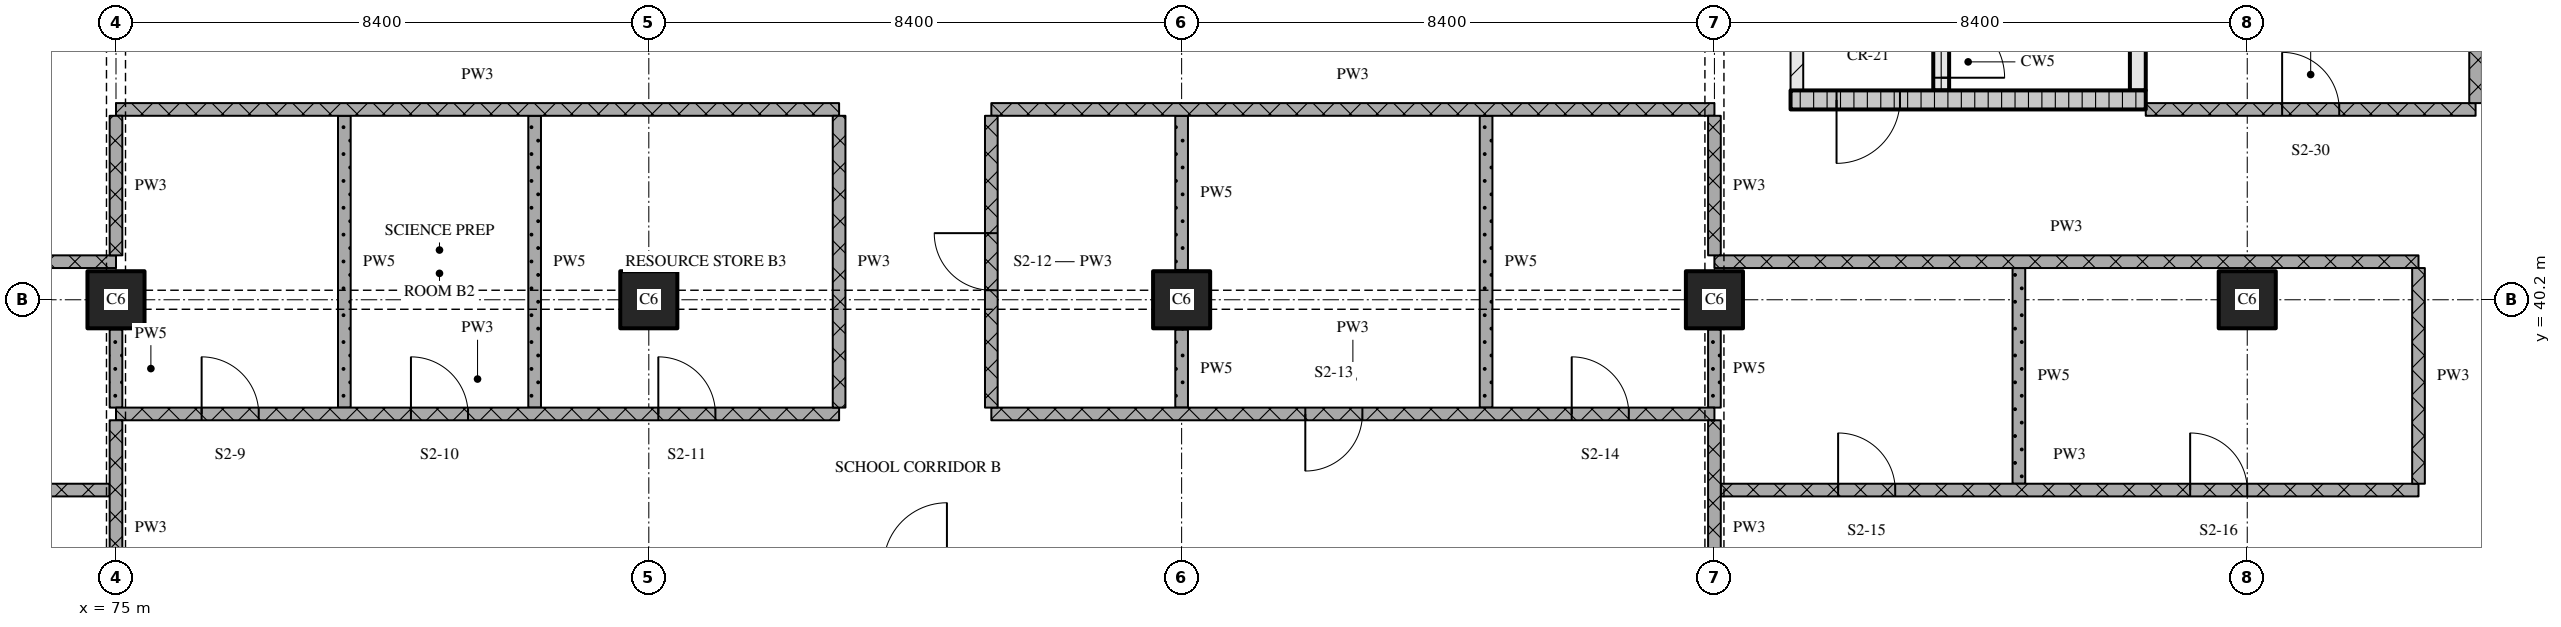
"""IFC4 building model, lengths in metres.
Left out: names, types, materials, properties, quantities, classifications, styles, units other than length and angle.
Written with IfcOpenShell. Run it as: python <this file> out.ifc"""

import sys

from ifc_helpers import new_model, si_unit, direction, frame, frame_2d, origin, origin_2d, place, context, subcontext, project, spatial, rectangle, extrude, element, fill, save


model = new_model("IFC4")
c1 = context("Model", 3, precision=1e-05, world=origin(), true_north=direction((0.0, 1.0)))
c2 = subcontext(c1, "Body", "Model", "MODEL_VIEW")
j1 = project(units=[si_unit("LENGTHUNIT", "METRE"), si_unit("PLANEANGLEUNIT", "RADIAN")], contexts=[c1])
p1 = place(None, origin())
s1 = spatial("IfcSite", under=j1, at=p1, CompositionType="ELEMENT")
p2 = place(p1, origin())
s2 = spatial("IfcBuilding", under=s1, at=p2, CompositionType="ELEMENT")
p3 = place(p2, frame((0.0, 0.0, 23.7)))
s3 = spatial("IfcBuildingStorey", under=s2, at=p3, CompositionType="ELEMENT", Elevation=23.7)
for number, where, z_axis, x_axis in (
    (1, (75.0, 40.2, 0.0), (0.0, 0.0, 1.0), (1.0, 0.0, 0.0)),
    (2, (83.4, 40.2, 0.0), (0.0, 0.0, 1.0), (1.0, 0.0, 0.0)),
    (3, (91.8, 40.2, 0.0), (0.0, 0.0, 1.0), (1.0, 0.0, 0.0)),
    (4, (100.2, 40.2, 0.0), (0.0, 0.0, 1.0), (1.0, 0.0, 0.0)),
    (5, (108.6, 40.2, 0.0), (0.0, 0.0, 1.0), (1.0, 0.0, 0.0)),
):
    element("IfcColumn", number, at=place(p3, frame(where, z_axis=z_axis, x_axis=x_axis)), inside=s3, PredefinedType="COLUMN", context=c2, shape_type="SweptSolid", body=[
        extrude(rectangle(XDim=0.9, YDim=0.9, at=origin_2d()), origin(), (0.0, 0.0, 1.0), 4.5),
    ])
p4 = place(p3, frame((101.4, 43.35, 0.0), z_axis=(0.0, 0.0, 1.0), x_axis=(1.0, 0.0, 0.0)))
e6 = element("IfcWall", 6, at=p4, inside=s3, PredefinedType="SOLIDWALL", context=c2, shape_type="SweptSolid", body=[
    extrude(rectangle(XDim=5.6, YDim=0.3, at=frame_2d((2.8, 0.0))), origin(), (0.0, 0.0, 1.0), 4.2),
])
p5 = place(p4, frame((0.725, 0.0, 0.0)))
e7 = element("IfcOpeningElement", 7, at=p5, cuts=e6, PredefinedType="OPENING", context=c2, shape_type="SweptSolid", body=[
    extrude(rectangle(XDim=1.0, YDim=2.1, at=frame_2d((0.5, 1.05))), frame((0.0, 0.16, 0.0), z_axis=(0.0, -1.0, 0.0), x_axis=(1.0, 0.0, 0.0)), (0.0, 0.0, 1.0), 0.32),
])
p6 = place(p3, frame((101.5, 43.5, 0.0), z_axis=(0.0, 0.0, 1.0), x_axis=(0.0, 1.0, 0.0)))
e8 = element("IfcWall", 8, at=p6, inside=s3, PredefinedType="PARTITIONING", context=c2, shape_type="SweptSolid", body=[
    extrude(rectangle(XDim=6.9, YDim=0.2, at=frame_2d((3.45, 0.0))), origin(), (0.0, 0.0, 1.0), 4.2),
])
p7 = place(p6, frame((1.0, 0.0, 0.0)))
e9 = element("IfcOpeningElement", 9, at=p7, cuts=e8, PredefinedType="OPENING", context=c2, shape_type="SweptSolid", body=[
    extrude(rectangle(XDim=1.0, YDim=2.1, at=frame_2d((0.5, 1.05))), frame((0.0, 0.11, 0.0), z_axis=(0.0, -1.0, 0.0), x_axis=(1.0, 0.0, 0.0)), (0.0, 0.0, 1.0), 0.22),
])
p8 = place(p3, frame((103.775, 43.5, 0.0), z_axis=(0.0, 0.0, 1.0), x_axis=(0.0, 1.0, 0.0)))
e10 = element("IfcWall", 10, at=p8, inside=s3, PredefinedType="SOLIDWALL", context=c2, shape_type="SweptSolid", body=[
    extrude(rectangle(XDim=6.9, YDim=0.25, at=frame_2d((3.45, 0.0))), origin(), (0.0, 0.0, 1.0), 4.2),
])
p9 = place(p8, frame((0.2, 0.0, 0.0)))
e11 = element("IfcOpeningElement", 11, at=p9, cuts=e10, PredefinedType="OPENING", context=c2, shape_type="SweptSolid", body=[
    extrude(rectangle(XDim=1.0, YDim=2.1, at=frame_2d((0.5, 1.05))), frame((0.0, 0.135, 0.0), z_axis=(0.0, -1.0, 0.0), x_axis=(1.0, 0.0, 0.0)), (0.0, 0.0, 1.0), 0.27),
])
p10 = place(p3, frame((106.875, 43.5, 0.0), z_axis=(0.0, 0.0, 1.0), x_axis=(0.0, 1.0, 0.0)))
e12 = element("IfcWall", 12, at=p10, inside=s3, PredefinedType="SOLIDWALL", context=c2, shape_type="SweptSolid", body=[
    extrude(rectangle(XDim=6.9, YDim=0.25, at=frame_2d((3.45, 0.0))), origin(), (0.0, 0.0, 1.0), 4.2),
])
p11 = place(p3, frame((63.9, 37.2, 0.0), z_axis=(0.0, 0.0, 1.0), x_axis=(1.0, 0.0, 0.0)))
e13 = element("IfcWall", 13, at=p11, inside=s3, PredefinedType="PARTITIONING", context=c2, shape_type="SweptSolid", body=[
    extrude(rectangle(XDim=11.0, YDim=0.2, at=frame_2d((5.5, 0.0))), origin(), (0.0, 0.0, 1.0), 4.2),
])
p12 = place(p11, frame((7.5, 0.0, 0.0)))
e14 = element("IfcOpeningElement", 14, at=p12, cuts=e13, PredefinedType="OPENING", context=c2, shape_type="SweptSolid", body=[
    extrude(rectangle(XDim=0.9, YDim=2.1, at=frame_2d((0.45, 1.05))), frame((0.0, 0.11, 0.0), z_axis=(0.0, -1.0, 0.0), x_axis=(1.0, 0.0, 0.0)), (0.0, 0.0, 1.0), 0.22),
])
p13 = place(p3, frame((100.3, 37.2, 0.0), z_axis=(0.0, 0.0, 1.0), x_axis=(1.0, 0.0, 0.0)))
e15 = element("IfcWall", 15, at=p13, inside=s3, PredefinedType="PARTITIONING", context=c2, shape_type="SweptSolid", body=[
    extrude(rectangle(XDim=11.0, YDim=0.2, at=frame_2d((5.5, 0.0))), origin(), (0.0, 0.0, 1.0), 4.2),
])
p14 = place(p13, frame((1.85, 0.0, 0.0)))
e16 = element("IfcOpeningElement", 16, at=p14, cuts=e15, PredefinedType="OPENING", context=c2, shape_type="SweptSolid", body=[
    extrude(rectangle(XDim=0.9, YDim=2.1, at=frame_2d((0.45, 1.05))), frame((0.0, 0.11, 0.0), z_axis=(0.0, -1.0, 0.0), x_axis=(1.0, 0.0, 0.0)), (0.0, 0.0, 1.0), 0.22),
])
p15 = place(p13, frame((7.4, 0.0, 0.0)))
e17 = element("IfcOpeningElement", 17, at=p15, cuts=e15, PredefinedType="OPENING", context=c2, shape_type="SweptSolid", body=[
    extrude(rectangle(XDim=0.9, YDim=2.1, at=frame_2d((0.45, 1.05))), frame((0.0, 0.11, 0.0), z_axis=(0.0, -1.0, 0.0), x_axis=(1.0, 0.0, 0.0)), (0.0, 0.0, 1.0), 0.22),
])
p16 = place(p3, frame((75.0, 38.4, 0.0), z_axis=(0.0, 0.0, 1.0), x_axis=(1.0, 0.0, 0.0)))
e18 = element("IfcWall", 18, at=p16, inside=s3, PredefinedType="PARTITIONING", context=c2, shape_type="SweptSolid", body=[
    extrude(rectangle(XDim=11.4, YDim=0.2, at=frame_2d((5.7, 0.0))), origin(), (0.0, 0.0, 1.0), 4.2),
])
p17 = place(p16, frame((1.35, 0.0, 0.0)))
e19 = element("IfcOpeningElement", 19, at=p17, cuts=e18, PredefinedType="OPENING", context=c2, shape_type="SweptSolid", body=[
    extrude(rectangle(XDim=0.9, YDim=2.1, at=frame_2d((0.45, 1.05))), frame((0.0, 0.11, 0.0), z_axis=(0.0, -1.0, 0.0), x_axis=(1.0, 0.0, 0.0)), (0.0, 0.0, 1.0), 0.22),
])
p18 = place(p16, frame((4.65, 0.0, 0.0)))
e20 = element("IfcOpeningElement", 20, at=p18, cuts=e18, PredefinedType="OPENING", context=c2, shape_type="SweptSolid", body=[
    extrude(rectangle(XDim=0.9, YDim=2.1, at=frame_2d((0.45, 1.05))), frame((0.0, 0.11, 0.0), z_axis=(0.0, -1.0, 0.0), x_axis=(1.0, 0.0, 0.0)), (0.0, 0.0, 1.0), 0.22),
])
p19 = place(p16, frame((8.55, 0.0, 0.0)))
e21 = element("IfcOpeningElement", 21, at=p19, cuts=e18, PredefinedType="OPENING", context=c2, shape_type="SweptSolid", body=[
    extrude(rectangle(XDim=0.9, YDim=2.1, at=frame_2d((0.45, 1.05))), frame((0.0, 0.11, 0.0), z_axis=(0.0, -1.0, 0.0), x_axis=(1.0, 0.0, 0.0)), (0.0, 0.0, 1.0), 0.22),
])
p20 = place(p3, frame((88.8, 38.4, 0.0), z_axis=(0.0, 0.0, 1.0), x_axis=(1.0, 0.0, 0.0)))
e22 = element("IfcWall", 22, at=p20, inside=s3, PredefinedType="PARTITIONING", context=c2, shape_type="SweptSolid", body=[
    extrude(rectangle(XDim=11.4, YDim=0.2, at=frame_2d((5.7, 0.0))), origin(), (0.0, 0.0, 1.0), 4.2),
])
p21 = place(p20, frame((4.95, 0.0, 0.0)))
e23 = element("IfcOpeningElement", 23, at=p21, cuts=e22, PredefinedType="OPENING", context=c2, shape_type="SweptSolid", body=[
    extrude(rectangle(XDim=0.9, YDim=2.1, at=frame_2d((0.45, 1.05))), frame((0.0, 0.11, 0.0), z_axis=(0.0, -1.0, 0.0), x_axis=(1.0, 0.0, 0.0)), (0.0, 0.0, 1.0), 0.22),
])
p22 = place(p20, frame((9.15, 0.0, 0.0)))
e24 = element("IfcOpeningElement", 24, at=p22, cuts=e22, PredefinedType="OPENING", context=c2, shape_type="SweptSolid", body=[
    extrude(rectangle(XDim=0.9, YDim=2.1, at=frame_2d((0.45, 1.05))), frame((0.0, 0.11, 0.0), z_axis=(0.0, -1.0, 0.0), x_axis=(1.0, 0.0, 0.0)), (0.0, 0.0, 1.0), 0.22),
])
for number, where, z_axis, x_axis in (
    (25, (63.9, 40.8, 0.0), (0.0, 0.0, 1.0), (1.0, 0.0, 0.0)),
    (26, (100.2, 40.8, 0.0), (0.0, 0.0, 1.0), (1.0, 0.0, 0.0)),
):
    element("IfcWall", number, at=place(p3, frame(where, z_axis=z_axis, x_axis=x_axis)), inside=s3, PredefinedType="PARTITIONING", context=c2, shape_type="SweptSolid", body=[
        extrude(rectangle(XDim=11.1, YDim=0.2, at=frame_2d((5.55, 0.0))), origin(), (0.0, 0.0, 1.0), 4.2),
    ])
for number, where, z_axis, x_axis in (
    (27, (75.0, 43.2, 0.0), (0.0, 0.0, 1.0), (1.0, 0.0, 0.0)),
    (28, (88.8, 43.2, 0.0), (0.0, 0.0, 1.0), (1.0, 0.0, 0.0)),
):
    element("IfcWall", number, at=place(p3, frame(where, z_axis=z_axis, x_axis=x_axis)), inside=s3, PredefinedType="PARTITIONING", context=c2, shape_type="SweptSolid", body=[
        extrude(rectangle(XDim=11.4, YDim=0.2, at=frame_2d((5.7, 0.0))), origin(), (0.0, 0.0, 1.0), 4.2),
    ])
p23 = place(p3, frame((107.0, 43.2, 0.0), z_axis=(0.0, 0.0, 1.0), x_axis=(1.0, 0.0, 0.0)))
e29 = element("IfcWall", 29, at=p23, inside=s3, PredefinedType="PARTITIONING", context=c2, shape_type="SweptSolid", body=[
    extrude(rectangle(XDim=5.2, YDim=0.2, at=frame_2d((2.6, 0.0))), origin(), (0.0, 0.0, 1.0), 4.2),
])
p24 = place(p23, frame((2.15, 0.0, 0.0)))
e30 = element("IfcOpeningElement", 30, at=p24, cuts=e29, PredefinedType="OPENING", context=c2, shape_type="SweptSolid", body=[
    extrude(rectangle(XDim=0.9, YDim=2.1, at=frame_2d((0.45, 1.05))), frame((0.0, 0.11, 0.0), z_axis=(0.0, -1.0, 0.0), x_axis=(1.0, 0.0, 0.0)), (0.0, 0.0, 1.0), 0.22),
])
p25 = place(p3, frame((75.0, 38.3, 0.0), z_axis=(0.0, 0.0, 1.0), x_axis=(0.0, -1.0, 0.0)))
e31 = element("IfcWall", 31, at=p25, inside=s3, PredefinedType="PARTITIONING", context=c2, shape_type="SweptSolid", body=[
    extrude(rectangle(XDim=3.4, YDim=0.2, at=frame_2d((1.7, 0.0))), origin(), (0.0, 0.0, 1.0), 3.7),
])
p26 = place(p3, frame((75.0, 43.1, 0.0), z_axis=(0.0, 0.0, 1.0), x_axis=(0.0, -1.0, 0.0)))
e32 = element("IfcWall", 32, at=p26, inside=s3, PredefinedType="PARTITIONING", context=c2, shape_type="SweptSolid", body=[
    extrude(rectangle(XDim=2.2, YDim=0.2, at=frame_2d((1.1, 0.0))), origin(), (0.0, 0.0, 1.0), 3.3),
])
p27 = place(p3, frame((75.0, 39.73, 0.0), z_axis=(0.0, 0.0, 1.0), x_axis=(0.0, -1.0, 0.0)))
e33 = element("IfcWall", 33, at=p27, inside=s3, PredefinedType="PARTITIONING", context=c2, shape_type="SweptSolid", body=[
    extrude(rectangle(XDim=1.23, YDim=0.2, at=frame_2d((0.615, 0.0))), origin(), (0.0, 0.0, 1.0), 3.7),
])
for number, where, z_axis, x_axis in (
    (34, (78.6, 43.1, 0.0), (0.0, 0.0, 1.0), (0.0, -1.0, 0.0)),
    (35, (81.6, 43.1, 0.0), (0.0, 0.0, 1.0), (0.0, -1.0, 0.0)),
    (36, (86.4, 43.1, 0.0), (0.0, 0.0, 1.0), (0.0, -1.0, 0.0)),
):
    element("IfcWall", number, at=place(p3, frame(where, z_axis=z_axis, x_axis=x_axis)), inside=s3, PredefinedType="PARTITIONING", context=c2, shape_type="SweptSolid", body=[
        extrude(rectangle(XDim=4.6, YDim=0.2, at=frame_2d((2.3, 0.0))), origin(), (0.0, 0.0, 1.0), 4.2),
    ])
p28 = place(p3, frame((88.8, 43.1, 0.0), z_axis=(0.0, 0.0, 1.0), x_axis=(0.0, -1.0, 0.0)))
e37 = element("IfcWall", 37, at=p28, inside=s3, PredefinedType="PARTITIONING", context=c2, shape_type="SweptSolid", body=[
    extrude(rectangle(XDim=4.6, YDim=0.2, at=frame_2d((2.3, 0.0))), origin(), (0.0, 0.0, 1.0), 4.2),
])
p29 = place(p28, frame((1.85, 0.0, 0.0)))
e38 = element("IfcOpeningElement", 38, at=p29, cuts=e37, PredefinedType="OPENING", context=c2, shape_type="SweptSolid", body=[
    extrude(rectangle(XDim=0.9, YDim=2.1, at=frame_2d((0.45, 1.05))), frame((0.0, 0.11, 0.0), z_axis=(0.0, -1.0, 0.0), x_axis=(1.0, 0.0, 0.0)), (0.0, 0.0, 1.0), 0.22),
])
p30 = place(p3, frame((91.8, 39.73, 0.0), z_axis=(0.0, 0.0, 1.0), x_axis=(0.0, -1.0, 0.0)))
e39 = element("IfcWall", 39, at=p30, inside=s3, PredefinedType="PARTITIONING", context=c2, shape_type="SweptSolid", body=[
    extrude(rectangle(XDim=1.23, YDim=0.2, at=frame_2d((0.615, 0.0))), origin(), (0.0, 0.0, 1.0), 4.2),
])
p31 = place(p3, frame((91.8, 43.1, 0.0), z_axis=(0.0, 0.0, 1.0), x_axis=(0.0, -1.0, 0.0)))
e40 = element("IfcWall", 40, at=p31, inside=s3, PredefinedType="PARTITIONING", context=c2, shape_type="SweptSolid", body=[
    extrude(rectangle(XDim=2.43, YDim=0.2, at=frame_2d((1.215, 0.0))), origin(), (0.0, 0.0, 1.0), 4.2),
])
p32 = place(p3, frame((96.6, 43.1, 0.0), z_axis=(0.0, 0.0, 1.0), x_axis=(0.0, -1.0, 0.0)))
e41 = element("IfcWall", 41, at=p32, inside=s3, PredefinedType="PARTITIONING", context=c2, shape_type="SweptSolid", body=[
    extrude(rectangle(XDim=4.6, YDim=0.2, at=frame_2d((2.3, 0.0))), origin(), (0.0, 0.0, 1.0), 4.2),
])
p33 = place(p3, frame((100.2, 38.3, 0.0), z_axis=(0.0, 0.0, 1.0), x_axis=(0.0, -1.0, 0.0)))
e42 = element("IfcWall", 42, at=p33, inside=s3, PredefinedType="PARTITIONING", context=c2, shape_type="SweptSolid", body=[
    extrude(rectangle(XDim=3.4, YDim=0.2, at=frame_2d((1.7, 0.0))), origin(), (0.0, 0.0, 1.0), 3.7),
])
p34 = place(p3, frame((100.2, 43.1, 0.0), z_axis=(0.0, 0.0, 1.0), x_axis=(0.0, -1.0, 0.0)))
e43 = element("IfcWall", 43, at=p34, inside=s3, PredefinedType="PARTITIONING", context=c2, shape_type="SweptSolid", body=[
    extrude(rectangle(XDim=2.2, YDim=0.2, at=frame_2d((1.1, 0.0))), origin(), (0.0, 0.0, 1.0), 3.3),
])
p35 = place(p3, frame((100.2, 39.73, 0.0), z_axis=(0.0, 0.0, 1.0), x_axis=(0.0, -1.0, 0.0)))
e44 = element("IfcWall", 44, at=p35, inside=s3, PredefinedType="PARTITIONING", context=c2, shape_type="SweptSolid", body=[
    extrude(rectangle(XDim=1.23, YDim=0.2, at=frame_2d((0.615, 0.0))), origin(), (0.0, 0.0, 1.0), 3.7),
])
for number, where, z_axis, x_axis in (
    (45, (105.0, 40.7, 0.0), (0.0, 0.0, 1.0), (0.0, -1.0, 0.0)),
    (46, (111.3, 40.7, 0.0), (0.0, 0.0, 1.0), (0.0, -1.0, 0.0)),
):
    element("IfcWall", number, at=place(p3, frame(where, z_axis=z_axis, x_axis=x_axis)), inside=s3, PredefinedType="PARTITIONING", context=c2, shape_type="SweptSolid", body=[
        extrude(rectangle(XDim=3.4, YDim=0.2, at=frame_2d((1.7, 0.0))), origin(), (0.0, 0.0, 1.0), 4.2),
    ])
p36 = place(p3, frame((112.2, 43.3, 0.0), z_axis=(0.0, 0.0, 1.0), x_axis=(0.0, 1.0, 0.0)))
e47 = element("IfcWall", 47, at=p36, inside=s3, PredefinedType="PARTITIONING", context=c2, shape_type="SweptSolid", body=[
    extrude(rectangle(XDim=15.4, YDim=0.2, at=frame_2d((7.7, 0.0))), origin(), (0.0, 0.0, 1.0), 4.2),
])
p37 = place(p36, frame((7.962, 0.0, 0.0)))
e48 = element("IfcOpeningElement", 48, at=p37, cuts=e47, PredefinedType="OPENING", context=c2, shape_type="SweptSolid", body=[
    extrude(rectangle(XDim=0.9, YDim=2.1, at=frame_2d((0.45, 1.05))), frame((0.0, 0.11, 0.0), z_axis=(0.0, -1.0, 0.0), x_axis=(1.0, 0.0, 0.0)), (0.0, 0.0, 1.0), 0.22),
])
p38 = place(p36, frame((9.988, 0.0, 0.0)))
e49 = element("IfcOpeningElement", 49, at=p38, cuts=e47, PredefinedType="OPENING", context=c2, shape_type="SweptSolid", body=[
    extrude(rectangle(XDim=0.9, YDim=2.1, at=frame_2d((0.45, 1.05))), frame((0.0, 0.11, 0.0), z_axis=(0.0, -1.0, 0.0), x_axis=(1.0, 0.0, 0.0)), (0.0, 0.0, 1.0), 0.22),
])
p39 = place(p36, frame((12.012, 0.0, 0.0)))
e50 = element("IfcOpeningElement", 50, at=p39, cuts=e47, PredefinedType="OPENING", context=c2, shape_type="SweptSolid", body=[
    extrude(rectangle(XDim=0.9, YDim=2.1, at=frame_2d((0.45, 1.05))), frame((0.0, 0.11, 0.0), z_axis=(0.0, -1.0, 0.0), x_axis=(1.0, 0.0, 0.0)), (0.0, 0.0, 1.0), 0.22),
])
p40 = place(p36, frame((14.038, 0.0, 0.0)))
e51 = element("IfcOpeningElement", 51, at=p40, cuts=e47, PredefinedType="OPENING", context=c2, shape_type="SweptSolid", body=[
    extrude(rectangle(XDim=0.9, YDim=2.1, at=frame_2d((0.45, 1.05))), frame((0.0, 0.11, 0.0), z_axis=(0.0, -1.0, 0.0), x_axis=(1.0, 0.0, 0.0)), (0.0, 0.0, 1.0), 0.22),
])
p41 = place(p5, origin())
e52 = element("IfcDoor", 52, at=p41, inside=s3, OperationType="SINGLE_SWING_RIGHT", PredefinedType="DOOR", context=c2, shape_type="SweptSolid", body=[
    extrude(rectangle(XDim=1.0, YDim=2.1, at=frame_2d((0.5, 1.05))), frame((0.0, 0.025, 0.0), z_axis=(0.0, -1.0, 0.0), x_axis=(1.0, 0.0, 0.0)), (0.0, 0.0, 1.0), 0.05),
])
fill(e7, e52)
p42 = place(p9, origin())
e53 = element("IfcDoor", 53, at=p42, inside=s3, OperationType="SINGLE_SWING_RIGHT", PredefinedType="DOOR", context=c2, shape_type="SweptSolid", body=[
    extrude(rectangle(XDim=1.0, YDim=2.1, at=frame_2d((0.5, 1.05))), frame((0.0, 0.025, 0.0), z_axis=(0.0, -1.0, 0.0), x_axis=(1.0, 0.0, 0.0)), (0.0, 0.0, 1.0), 0.05),
])
fill(e11, e53)
p43 = place(p14, origin())
e54 = element("IfcDoor", 54, at=p43, inside=s3, OperationType="SINGLE_SWING_LEFT", PredefinedType="DOOR", context=c2, shape_type="SweptSolid", body=[
    extrude(rectangle(XDim=0.9, YDim=2.1, at=frame_2d((0.45, 1.05))), frame((0.0, 0.025, 0.0), z_axis=(0.0, -1.0, 0.0), x_axis=(1.0, 0.0, 0.0)), (0.0, 0.0, 1.0), 0.05),
])
fill(e16, e54)
p44 = place(p15, origin())
e55 = element("IfcDoor", 55, at=p44, inside=s3, OperationType="SINGLE_SWING_LEFT", PredefinedType="DOOR", context=c2, shape_type="SweptSolid", body=[
    extrude(rectangle(XDim=0.9, YDim=2.1, at=frame_2d((0.45, 1.05))), frame((0.0, 0.025, 0.0), z_axis=(0.0, -1.0, 0.0), x_axis=(1.0, 0.0, 0.0)), (0.0, 0.0, 1.0), 0.05),
])
fill(e17, e55)
p45 = place(p17, origin())
e56 = element("IfcDoor", 56, at=p45, inside=s3, OperationType="SINGLE_SWING_LEFT", PredefinedType="DOOR", context=c2, shape_type="SweptSolid", body=[
    extrude(rectangle(XDim=0.9, YDim=2.1, at=frame_2d((0.45, 1.05))), frame((0.0, 0.025, 0.0), z_axis=(0.0, -1.0, 0.0), x_axis=(1.0, 0.0, 0.0)), (0.0, 0.0, 1.0), 0.05),
])
fill(e19, e56)
p46 = place(p18, origin())
e57 = element("IfcDoor", 57, at=p46, inside=s3, OperationType="SINGLE_SWING_LEFT", PredefinedType="DOOR", context=c2, shape_type="SweptSolid", body=[
    extrude(rectangle(XDim=0.9, YDim=2.1, at=frame_2d((0.45, 1.05))), frame((0.0, 0.025, 0.0), z_axis=(0.0, -1.0, 0.0), x_axis=(1.0, 0.0, 0.0)), (0.0, 0.0, 1.0), 0.05),
])
fill(e20, e57)
p47 = place(p19, origin())
e58 = element("IfcDoor", 58, at=p47, inside=s3, OperationType="SINGLE_SWING_LEFT", PredefinedType="DOOR", context=c2, shape_type="SweptSolid", body=[
    extrude(rectangle(XDim=0.9, YDim=2.1, at=frame_2d((0.45, 1.05))), frame((0.0, 0.025, 0.0), z_axis=(0.0, -1.0, 0.0), x_axis=(1.0, 0.0, 0.0)), (0.0, 0.0, 1.0), 0.05),
])
fill(e21, e58)
p48 = place(p21, origin())
e59 = element("IfcDoor", 59, at=p48, inside=s3, OperationType="SINGLE_SWING_RIGHT", PredefinedType="DOOR", context=c2, shape_type="SweptSolid", body=[
    extrude(rectangle(XDim=0.9, YDim=2.1, at=frame_2d((0.45, 1.05))), frame((0.0, 0.025, 0.0), z_axis=(0.0, -1.0, 0.0), x_axis=(1.0, 0.0, 0.0)), (0.0, 0.0, 1.0), 0.05),
])
fill(e23, e59)
p49 = place(p22, origin())
e60 = element("IfcDoor", 60, at=p49, inside=s3, OperationType="SINGLE_SWING_LEFT", PredefinedType="DOOR", context=c2, shape_type="SweptSolid", body=[
    extrude(rectangle(XDim=0.9, YDim=2.1, at=frame_2d((0.45, 1.05))), frame((0.0, 0.025, 0.0), z_axis=(0.0, -1.0, 0.0), x_axis=(1.0, 0.0, 0.0)), (0.0, 0.0, 1.0), 0.05),
])
fill(e24, e60)
p50 = place(p24, origin())
e61 = element("IfcDoor", 61, at=p50, inside=s3, OperationType="SINGLE_SWING_LEFT", PredefinedType="DOOR", context=c2, shape_type="SweptSolid", body=[
    extrude(rectangle(XDim=0.9, YDim=2.1, at=frame_2d((0.45, 1.05))), frame((0.0, 0.025, 0.0), z_axis=(0.0, -1.0, 0.0), x_axis=(1.0, 0.0, 0.0)), (0.0, 0.0, 1.0), 0.05),
])
fill(e30, e61)
p51 = place(p29, origin())
e62 = element("IfcDoor", 62, at=p51, inside=s3, OperationType="SINGLE_SWING_RIGHT", PredefinedType="DOOR", context=c2, shape_type="SweptSolid", body=[
    extrude(rectangle(XDim=0.9, YDim=2.1, at=frame_2d((0.45, 1.05))), frame((0.0, 0.025, 0.0), z_axis=(0.0, -1.0, 0.0), x_axis=(1.0, 0.0, 0.0)), (0.0, 0.0, 1.0), 0.05),
])
fill(e38, e62)
save(model, sys.argv[1])
